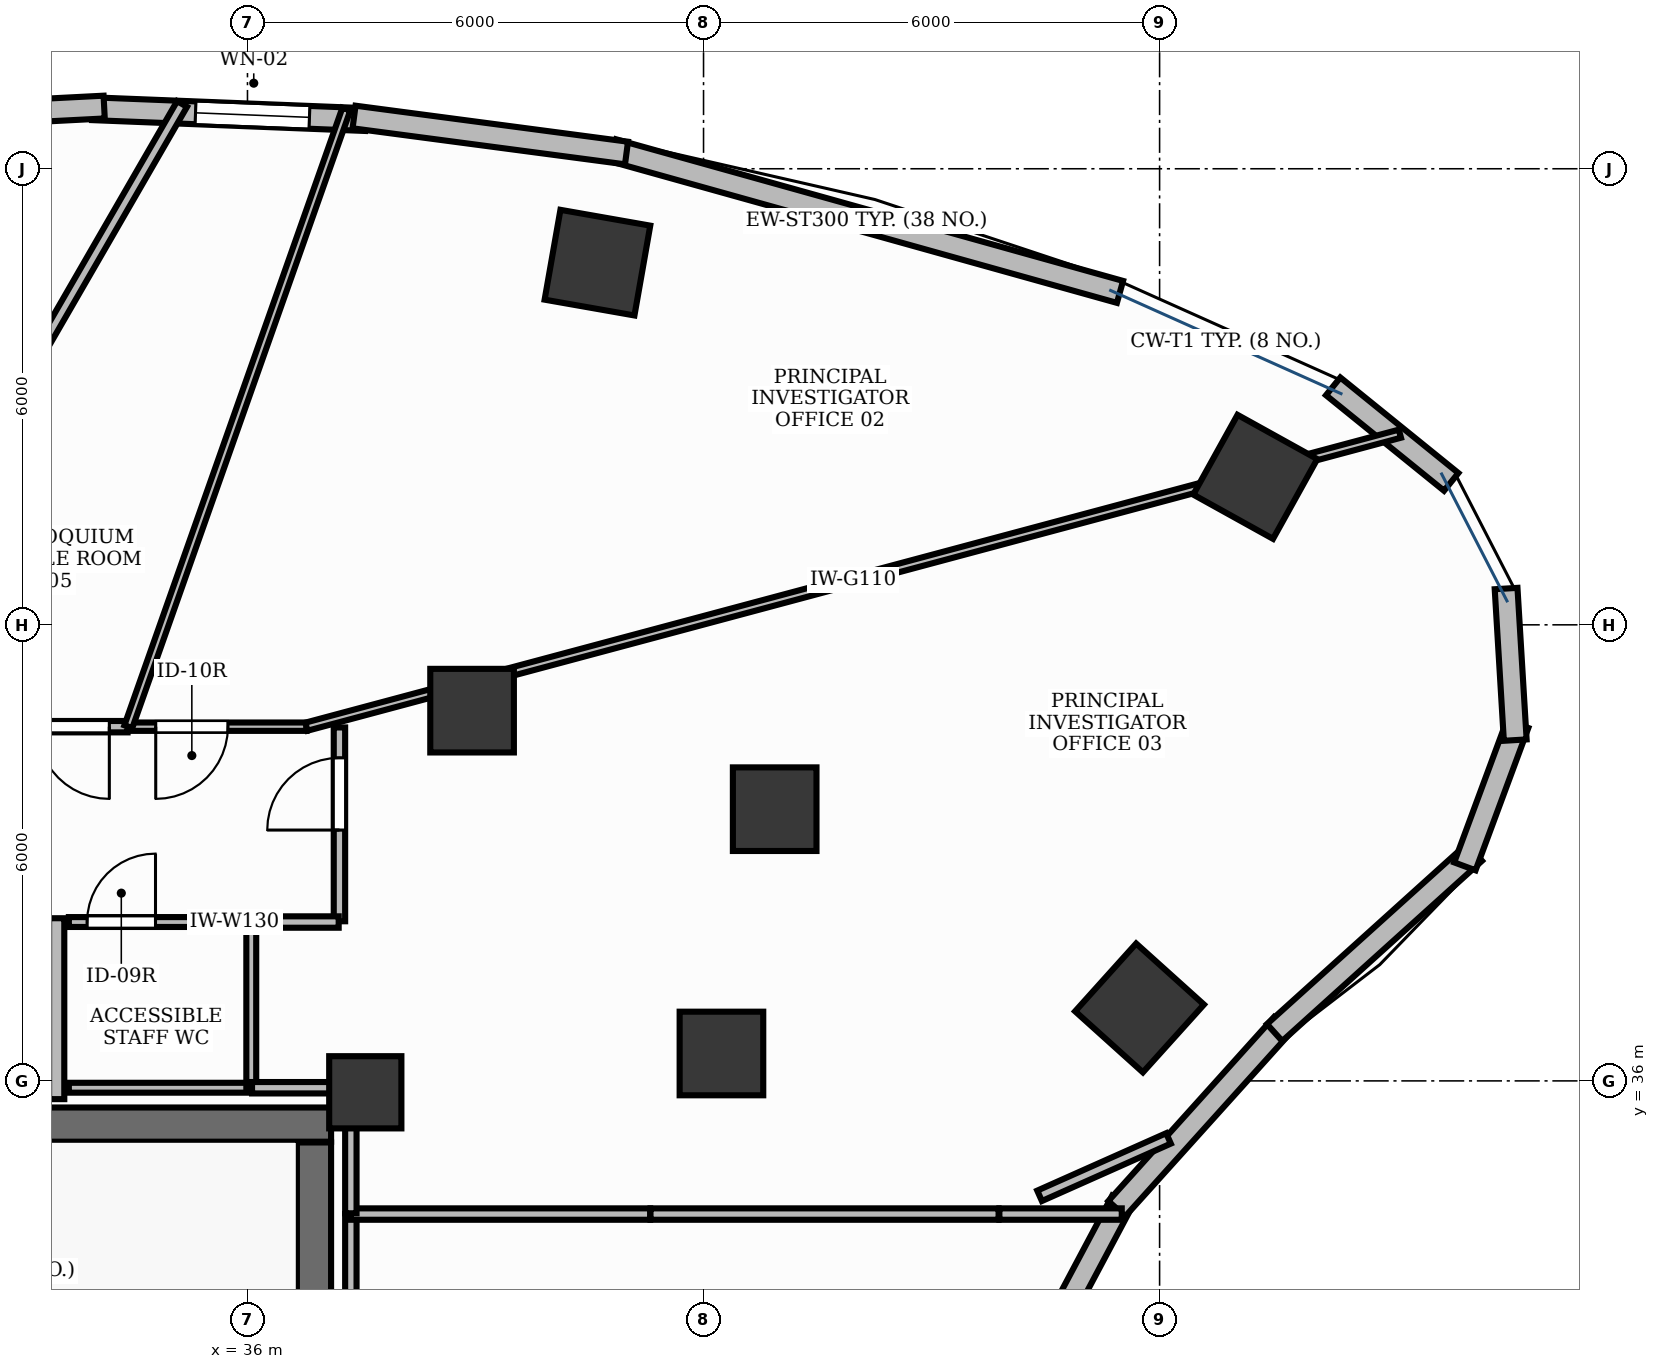
"""IFC4 building model, lengths in metres.
Left out: names, types, materials, properties, quantities, classifications, styles, units other than length and angle.
Written with IfcOpenShell. Run it as: python <this file> out.ifc"""

import sys

from ifc_helpers import new_model, si_unit, direction, frame, frame_2d, origin, origin_2d, place, context, subcontext, project, spatial, rectangle, extrude, element, fill, save


model = new_model("IFC4")
c1 = context("Model", 3, precision=1e-05, world=origin(), true_north=direction((0.0, 1.0)))
c2 = subcontext(c1, "Body", "Model", "MODEL_VIEW")
j1 = project(units=[si_unit("LENGTHUNIT", "METRE"), si_unit("PLANEANGLEUNIT", "RADIAN")], contexts=[c1])
p1 = place(None, origin())
s1 = spatial("IfcSite", under=j1, at=p1, CompositionType="ELEMENT")
p2 = place(p1, origin())
s2 = spatial("IfcBuilding", under=s1, at=p2, CompositionType="ELEMENT")
p3 = place(p2, frame((0.0, 0.0, 136.2)))
s3 = spatial("IfcBuildingStorey", under=s2, at=p3, CompositionType="ELEMENT", Elevation=136.2)
p4 = place(p3, frame((28.852, 35.425, 0.0), z_axis=(0.0, 0.0, 1.0), x_axis=(1.0, 0.0, 0.0)))
e1 = element("IfcWall", 1, at=p4, inside=s3, PredefinedType="SHEAR", context=c2, shape_type="SweptSolid", body=[
    extrude(rectangle(XDim=8.248, YDim=0.45, at=frame_2d((4.124, 0.0))), origin(), (0.0, 0.0, 1.0), 3.9),
])
p5 = place(p3, frame((36.875, 32.11, 0.0), z_axis=(0.0, 0.0, 1.0), x_axis=(0.0, 1.0, 0.0)))
e2 = element("IfcWall", 2, at=p5, inside=s3, PredefinedType="SHEAR", context=c2, shape_type="SweptSolid", body=[
    extrude(rectangle(XDim=3.08, YDim=0.45, at=frame_2d((1.54, 0.0))), origin(), (0.0, 0.0, 1.0), 3.9),
])
p6 = place(p3, frame((37.55, 35.85, -0.0), z_axis=(0.0, 0.0, 1.0), x_axis=(1.0, 0.0, 0.0)))
e3 = element("IfcColumn", 3, at=p6, inside=s3, PredefinedType="PILASTER", context=c2, shape_type="SweptSolid", body=[
    extrude(rectangle(XDim=0.95, YDim=0.95, at=origin_2d()), origin(), (0.0, 0.0, 1.0), 3.901),
])
p7 = place(p3, frame((49.259, 43.947, -0.0), z_axis=(0.0, 0.0, 1.0), x_axis=(-0.874535078577, 0.484962262797, 0.0)))
e4 = element("IfcColumn", 4, at=p7, inside=s3, PredefinedType="COLUMN", context=c2, shape_type="SweptSolid", body=[
    extrude(rectangle(XDim=1.2, YDim=1.2, at=origin_2d()), origin(), (0.0, 0.0, 1.0), 3.901),
])
p8 = place(p3, frame((42.936, 39.575, -0.0), z_axis=(0.0, 0.0, 1.0), x_axis=(1.0, 0.0, 0.0)))
e5 = element("IfcColumn", 5, at=p8, inside=s3, PredefinedType="COLUMN", context=c2, shape_type="SweptSolid", body=[
    extrude(rectangle(XDim=1.1, YDim=1.1, at=origin_2d()), origin(), (0.0, 0.0, 1.0), 3.901),
])
p9 = place(p3, frame((40.604, 46.765, -0.0), z_axis=(0.0, 0.0, 1.0), x_axis=(-0.984868307662, 0.173304404339, 0.0)))
e6 = element("IfcColumn", 6, at=p9, inside=s3, PredefinedType="COLUMN", context=c2, shape_type="SweptSolid", body=[
    extrude(rectangle(XDim=1.2, YDim=1.2, at=origin_2d()), origin(), (0.0, 0.0, 1.0), 3.901),
])
p10 = place(p3, frame((38.955, 40.871, -0.0), z_axis=(0.0, 0.0, 1.0), x_axis=(1.0, 0.0, 0.0)))
e7 = element("IfcColumn", 7, at=p10, inside=s3, PredefinedType="COLUMN", context=c2, shape_type="SweptSolid", body=[
    extrude(rectangle(XDim=1.1, YDim=1.1, at=origin_2d()), origin(), (0.0, 0.0, 1.0), 3.901),
])
p11 = place(p3, frame((47.736, 36.96, -0.0), z_axis=(0.0, 0.0, 1.0), x_axis=(0.669130606359, 0.743144825477, 0.0)))
e8 = element("IfcColumn", 8, at=p11, inside=s3, PredefinedType="COLUMN", context=c2, shape_type="SweptSolid", body=[
    extrude(rectangle(XDim=1.2, YDim=1.2, at=origin_2d()), origin(), (0.0, 0.0, 1.0), 3.901),
])
p12 = place(p3, frame((42.236, 36.361, -0.0), z_axis=(0.0, 0.0, 1.0), x_axis=(1.0, 0.0, 0.0)))
e9 = element("IfcColumn", 9, at=p12, inside=s3, PredefinedType="COLUMN", context=c2, shape_type="SweptSolid", body=[
    extrude(rectangle(XDim=1.1, YDim=1.1, at=origin_2d()), origin(), (0.0, 0.0, 1.0), 3.901),
])
p13 = place(p3, frame((37.554, 48.647, 0.0), z_axis=(0.0, 0.0, 1.0), x_axis=(-0.999210691503, 0.039723972445, 0.0)))
e10 = element("IfcWall", 10, at=p13, inside=s3, PredefinedType="STANDARD", context=c2, shape_type="SweptSolid", body=[
    extrude(rectangle(XDim=3.595, YDim=0.3, at=frame_2d((1.798, 0.0))), origin(), (0.0, 0.0, 1.0), 3.9),
])
p14 = place(p13, frame((0.739, 0.0, 0.95)))
e11 = element("IfcOpeningElement", 11, at=p14, cuts=e10, PredefinedType="OPENING", context=c2, shape_type="SweptSolid", body=[
    extrude(rectangle(XDim=1.5, YDim=1.8, at=frame_2d((0.75, 0.9))), frame((0.0, 0.165, 0.0), z_axis=(0.0, -1.0, 0.0), x_axis=(1.0, 0.0, 0.0)), (0.0, 0.0, 1.0), 0.33),
])
p15 = place(p3, frame((47.479, 46.38, 0.0), z_axis=(0.0, 0.0, 1.0), x_axis=(-0.963116215402, 0.269085777459, 0.0)))
e12 = element("IfcWall", 12, at=p15, inside=s3, PredefinedType="STANDARD", context=c2, shape_type="SweptSolid", body=[
    extrude(rectangle(XDim=6.924, YDim=0.3, at=frame_2d((3.462, 0.0))), origin(), (0.0, 0.0, 1.0), 3.9),
])
p16 = place(p3, frame((40.987, 48.207, 0.0), z_axis=(0.0, 0.0, 1.0), x_axis=(-0.991372969521, 0.131071107816, 0.0)))
e13 = element("IfcWall", 13, at=p16, inside=s3, PredefinedType="STANDARD", context=c2, shape_type="SweptSolid", body=[
    extrude(rectangle(XDim=3.615, YDim=0.3, at=frame_2d((1.808, 0.0))), origin(), (0.0, 0.0, 1.0), 3.9),
])
p17 = place(p3, frame((34.115, 48.812, 0.0), z_axis=(0.0, 0.0, 1.0), x_axis=(-0.998674767218, -0.051465613004, 0.0)))
e14 = element("IfcWall", 14, at=p17, inside=s3, PredefinedType="STANDARD", context=c2, shape_type="SweptSolid", body=[
    extrude(rectangle(XDim=3.634, YDim=0.3, at=frame_2d((1.817, 0.0))), origin(), (0.0, 0.0, 1.0), 3.9),
])
p18 = place(p3, frame((45.98, 31.547, 0.0), z_axis=(0.0, 0.0, 1.0), x_axis=(0.469451284634, 0.882958374645, 0.0)))
e15 = element("IfcWall", 15, at=p18, inside=s3, PredefinedType="STANDARD", context=c2, shape_type="SweptSolid", body=[
    extrude(rectangle(XDim=3.256, YDim=0.3, at=frame_2d((1.628, 0.0))), origin(), (0.0, 0.0, 1.0), 3.9),
])
p19 = place(p3, frame((47.437, 34.319, 0.0), z_axis=(0.0, 0.0, 1.0), x_axis=(0.669167727967, 0.743111399353, 0.0)))
e16 = element("IfcWall", 16, at=p19, inside=s3, PredefinedType="STANDARD", context=c2, shape_type="SweptSolid", body=[
    extrude(rectangle(XDim=3.255, YDim=0.3, at=frame_2d((1.628, 0.0))), origin(), (0.0, 0.0, 1.0), 3.9),
])
p20 = place(p3, frame((49.513, 36.636, 0.0), z_axis=(0.0, 0.0, 1.0), x_axis=(0.74255963233, 0.669779958221, 0.0)))
e17 = element("IfcWall", 17, at=p20, inside=s3, PredefinedType="STANDARD", context=c2, shape_type="SweptSolid", body=[
    extrude(rectangle(XDim=3.539, YDim=0.3, at=frame_2d((1.77, 0.0))), origin(), (0.0, 0.0, 1.0), 3.9),
])
p21 = place(p3, frame((52.016, 38.822, 0.0), z_axis=(0.0, 0.0, 1.0), x_axis=(0.347370087337, 0.937728117539, 0.0)))
e18 = element("IfcWall", 18, at=p21, inside=s3, PredefinedType="STANDARD", context=c2, shape_type="SweptSolid", body=[
    extrude(rectangle(XDim=1.997, YDim=0.3, at=frame_2d((0.999, 0.0))), origin(), (0.0, 0.0, 1.0), 3.9),
])
for number, where, z_axis, x_axis in (
    (19, (52.679, 40.483, 0.0), (0.0, 0.0, 1.0), (-0.06, 0.998, 0.0)),
    (20, (51.836, 43.881, 0.0), (0.0, 0.0, 1.0), (-0.777, 0.629, 0.0)),
):
    element("IfcWall", number, at=place(p3, frame(where, z_axis=z_axis, x_axis=x_axis)), inside=s3, PredefinedType="STANDARD", context=c2, shape_type="SweptSolid", body=[
        extrude(rectangle(XDim=1.998, YDim=0.3, at=frame_2d((0.999, 0.0))), origin(), (0.0, 0.0, 1.0), 3.9),
    ])
p22 = place(p3, frame((33.49, 35.76, 0.0), z_axis=(0.0, 0.0, 1.0), x_axis=(0.0, 1.0, 0.0)))
e21 = element("IfcWall", 21, at=p22, inside=s3, PredefinedType="PARTITIONING", context=c2, shape_type="SweptSolid", body=[
    extrude(rectangle(XDim=2.38, YDim=0.2, at=frame_2d((1.19, 0.0))), origin(), (0.0, 0.0, 1.0), 2.91),
])
p23 = place(p3, frame((33.65, 38.09, 0.0), z_axis=(0.0, 0.0, 1.0), x_axis=(1.0, 0.0, 0.0)))
e22 = element("IfcWall", 22, at=p23, inside=s3, PredefinedType="PARTITIONING", context=c2, shape_type="SweptSolid", body=[
    extrude(rectangle(XDim=2.4, YDim=0.13, at=frame_2d((1.2, 0.0))), origin(), (0.0, 0.0, 1.0), 2.91),
])
p24 = place(p23, frame((0.24, 0.0, 0.0)))
e23 = element("IfcOpeningElement", 23, at=p24, cuts=e22, PredefinedType="OPENING", context=c2, shape_type="SweptSolid", body=[
    extrude(rectangle(XDim=0.9, YDim=2.15, at=frame_2d((0.45, 1.075))), frame((0.0, 0.08, 0.0), z_axis=(0.0, -1.0, 0.0), x_axis=(1.0, 0.0, 0.0)), (0.0, 0.0, 1.0), 0.16),
])
p25 = place(p3, frame((36.776, 40.66, 0.0), z_axis=(0.0, 0.0, 1.0), x_axis=(-1.0, 0.0, 0.0)))
e24 = element("IfcWall", 24, at=p25, inside=s3, PredefinedType="MOVABLE", context=c2, shape_type="SweptSolid", body=[
    extrude(rectangle(XDim=2.344, YDim=0.11, at=frame_2d((1.172, 0.0))), origin(), (0.0, 0.0, 1.0), 2.91),
])
p26 = place(p25, frame((1.033, 0.0, 0.0)))
e25 = element("IfcOpeningElement", 25, at=p26, cuts=e24, PredefinedType="OPENING", context=c2, shape_type="SweptSolid", body=[
    extrude(rectangle(XDim=0.95, YDim=2.15, at=frame_2d((0.475, 1.075))), frame((0.0, 0.07, 0.0), z_axis=(0.0, -1.0, 0.0), x_axis=(1.0, 0.0, 0.0)), (0.0, 0.0, 1.0), 0.14),
])
p27 = place(p3, frame((37.21, 38.1, 0.0), z_axis=(0.0, 0.0, 1.0), x_axis=(0.0, 1.0, 0.0)))
e26 = element("IfcWall", 26, at=p27, inside=s3, PredefinedType="PARTITIONING", context=c2, shape_type="SweptSolid", body=[
    extrude(rectangle(XDim=2.55, YDim=0.15, at=frame_2d((1.275, 0.0))), origin(), (0.0, 0.0, 1.0), 2.91),
])
p28 = place(p27, frame((1.2, 0.0, 0.0)))
e27 = element("IfcOpeningElement", 27, at=p28, cuts=e26, PredefinedType="OPENING", context=c2, shape_type="SweptSolid", body=[
    extrude(rectangle(XDim=0.95, YDim=2.15, at=frame_2d((0.475, 1.075))), frame((0.0, 0.09, 0.0), z_axis=(0.0, -1.0, 0.0), x_axis=(1.0, 0.0, 0.0)), (0.0, 0.0, 1.0), 0.18),
])
p29 = place(p3, frame((34.423, 40.66, 0.0), z_axis=(0.0, 0.0, 1.0), x_axis=(-1.0, 0.0, 0.0)))
e28 = element("IfcWall", 28, at=p29, inside=s3, PredefinedType="PARTITIONING", context=c2, shape_type="SweptSolid", body=[
    extrude(rectangle(XDim=4.001, YDim=0.15, at=frame_2d((2.0, 0.0))), origin(), (0.0, 0.0, 1.0), 2.91),
])
p30 = place(p29, frame((0.24, 0.0, 0.0)))
e29 = element("IfcOpeningElement", 29, at=p30, cuts=e28, PredefinedType="OPENING", context=c2, shape_type="SweptSolid", body=[
    extrude(rectangle(XDim=0.95, YDim=2.15, at=frame_2d((0.475, 1.075))), frame((0.0, 0.09, 0.0), z_axis=(0.0, -1.0, 0.0), x_axis=(1.0, 0.0, 0.0)), (0.0, 0.0, 1.0), 0.18),
])
p31 = place(p3, frame((36.05, 35.91, 0.0), z_axis=(0.0, 0.0, 1.0), x_axis=(-1.0, 0.0, 0.0)))
e30 = element("IfcWall", 30, at=p31, inside=s3, PredefinedType="PARTITIONING", context=c2, shape_type="SweptSolid", body=[
    extrude(rectangle(XDim=2.4, YDim=0.13, at=frame_2d((1.2, 0.0))), origin(), (0.0, 0.0, 1.0), 2.91),
])
p32 = place(p3, frame((36.05, 38.09, 0.0), z_axis=(0.0, 0.0, 1.0), x_axis=(0.0, -1.0, 0.0)))
e31 = element("IfcWall", 31, at=p32, inside=s3, PredefinedType="PARTITIONING", context=c2, shape_type="SweptSolid", body=[
    extrude(rectangle(XDim=2.18, YDim=0.13, at=frame_2d((1.09, 0.0))), origin(), (0.0, 0.0, 1.0), 2.91),
])
p33 = place(p3, frame((37.36, 18.1, 0.0), z_axis=(0.0, 0.0, 1.0), x_axis=(0.0, 1.0, 0.0)))
e32 = element("IfcWall", 32, at=p33, inside=s3, PredefinedType="PARTITIONING", context=c2, shape_type="SweptSolid", body=[
    extrude(rectangle(XDim=16.148, YDim=0.15, at=frame_2d((8.074, 0.0))), origin(), (0.0, 0.0, 1.0), 2.91),
])
p34 = place(p3, frame((37.36, 34.248, 0.0), z_axis=(0.0, 0.0, 1.0), x_axis=(1.0, 0.0, 0.0)))
e33 = element("IfcWall", 33, at=p34, inside=s3, PredefinedType="PARTITIONING", context=c2, shape_type="SweptSolid", body=[
    extrude(rectangle(XDim=3.938, YDim=0.15, at=frame_2d((1.969, 0.0))), origin(), (0.0, 0.0, 1.0), 2.91),
])
p35 = place(p3, frame((41.302, 34.248, 0.0), z_axis=(0.0, 0.0, 1.0), x_axis=(1.0, 0.0, 0.0)))
e34 = element("IfcWall", 34, at=p35, inside=s3, PredefinedType="PARTITIONING", context=c2, shape_type="SweptSolid", body=[
    extrude(rectangle(XDim=4.58, YDim=0.15, at=frame_2d((2.29, 0.0))), origin(), (0.0, 0.0, 1.0), 2.91),
])
p36 = place(p3, frame((45.892, 34.248, 0.0), z_axis=(0.0, 0.0, 1.0), x_axis=(1.0, 0.0, 0.0)))
e35 = element("IfcWall", 35, at=p36, inside=s3, PredefinedType="PARTITIONING", context=c2, shape_type="SweptSolid", body=[
    extrude(rectangle(XDim=1.61, YDim=0.15, at=frame_2d((0.805, 0.0))), origin(), (0.0, 0.0, 1.0), 2.91),
])
p37 = place(p3, frame((51.162, 44.515, 0.0), z_axis=(0.0, 0.0, 1.0), x_axis=(-0.965923245436, -0.258828676785, 0.0)))
e36 = element("IfcWall", 36, at=p37, inside=s3, PredefinedType="MOVABLE", context=c2, shape_type="SweptSolid", body=[
    extrude(rectangle(XDim=14.893, YDim=0.11, at=frame_2d((7.447, 0.0))), origin(), (0.0, 0.0, 1.0), 2.91),
])
p38 = place(p3, frame((34.433, 40.66, 0.0), z_axis=(0.0, 0.0, 1.0), x_axis=(0.332889773539, 0.942965746288, 0.0)))
e37 = element("IfcWall", 37, at=p38, inside=s3, PredefinedType="MOVABLE", context=c2, shape_type="SweptSolid", body=[
    extrude(rectangle(XDim=8.617, YDim=0.11, at=frame_2d((4.308, 0.0))), origin(), (0.0, 0.0, 1.0), 2.91),
])
p39 = place(p3, frame((48.117, 35.243, 0.0), z_axis=(0.0, 0.0, 1.0), x_axis=(-0.913545637302, -0.406736239553, 0.0)))
e38 = element("IfcWall", 38, at=p39, inside=s3, PredefinedType="PARTITIONING", context=c2, shape_type="SweptSolid", body=[
    extrude(rectangle(XDim=1.856, YDim=0.15, at=frame_2d((0.928, 0.0))), origin(), (0.0, 0.0, 1.0), 2.91),
])
p40 = place(p3, frame((37.36, 34.258, 0.0), z_axis=(0.0, 0.0, 1.0), x_axis=(0.0, 1.0, 0.0)))
e39 = element("IfcWall", 39, at=p40, inside=s3, PredefinedType="PARTITIONING", context=c2, shape_type="SweptSolid", body=[
    extrude(rectangle(XDim=1.642, YDim=0.15, at=frame_2d((0.821, 0.0))), origin(), (0.0, 0.0, 1.0), 2.91),
])
p41 = place(p3, frame((37.35, 35.91, 0.0), z_axis=(0.0, 0.0, 1.0), x_axis=(-1.0, 0.0, 0.0)))
e40 = element("IfcWall", 40, at=p41, inside=s3, PredefinedType="PARTITIONING", context=c2, shape_type="SweptSolid", body=[
    extrude(rectangle(XDim=1.29, YDim=0.15, at=frame_2d((0.645, 0.0))), origin(), (0.0, 0.0, 1.0), 2.91),
])
p42 = place(p3, frame((36.06, 38.09, 0.0), z_axis=(0.0, 0.0, 1.0), x_axis=(1.0, 0.0, 0.0)))
e41 = element("IfcWall", 41, at=p42, inside=s3, PredefinedType="PARTITIONING", context=c2, shape_type="SweptSolid", body=[
    extrude(rectangle(XDim=1.14, YDim=0.15, at=frame_2d((0.57, 0.0))), origin(), (0.0, 0.0, 1.0), 2.91),
])
p43 = place(p3, frame((35.139, 48.852, 0.0), z_axis=(0.0, 0.0, 1.0), x_axis=(-0.499980869596, -0.866036448446, 0.0)))
e42 = element("IfcWall", 42, at=p43, inside=s3, PredefinedType="PARTITIONING", context=c2, shape_type="SweptSolid", body=[
    extrude(rectangle(XDim=9.459, YDim=0.15, at=frame_2d((4.729, 0.0))), origin(), (0.0, 0.0, 1.0), 2.91),
])
p44 = place(p14, origin())
e43 = element("IfcWindow", 43, at=p44, inside=s3, PartitioningType="DOUBLE_PANEL_VERTICAL", PredefinedType="WINDOW", context=c2, shape_type="SweptSolid", body=[
    extrude(rectangle(XDim=1.5, YDim=1.8, at=frame_2d((0.75, 0.9))), frame((0.0, 0.03, 0.0), z_axis=(0.0, -1.0, 0.0), x_axis=(1.0, 0.0, 0.0)), (0.0, 0.0, 1.0), 0.06),
])
fill(e11, e43)
p45 = place(p24, origin())
e44 = element("IfcDoor", 44, at=p45, inside=s3, OperationType="SINGLE_SWING_RIGHT", PredefinedType="DOOR", context=c2, shape_type="SweptSolid", body=[
    extrude(rectangle(XDim=0.9, YDim=2.15, at=frame_2d((0.45, 1.075))), frame((0.0, 0.025, 0.0), z_axis=(0.0, -1.0, 0.0), x_axis=(1.0, 0.0, 0.0)), (0.0, 0.0, 1.0), 0.05),
])
fill(e23, e44)
p46 = place(p26, origin())
e45 = element("IfcDoor", 45, at=p46, inside=s3, OperationType="SINGLE_SWING_RIGHT", PredefinedType="DOOR", context=c2, shape_type="SweptSolid", body=[
    extrude(rectangle(XDim=0.95, YDim=2.15, at=frame_2d((0.475, 1.075))), frame((0.0, 0.025, 0.0), z_axis=(0.0, -1.0, 0.0), x_axis=(1.0, 0.0, 0.0)), (0.0, 0.0, 1.0), 0.05),
])
fill(e25, e45)
p47 = place(p28, origin())
e46 = element("IfcDoor", 46, at=p47, inside=s3, OperationType="SINGLE_SWING_LEFT", PredefinedType="DOOR", context=c2, shape_type="SweptSolid", body=[
    extrude(rectangle(XDim=0.95, YDim=2.15, at=frame_2d((0.475, 1.075))), frame((0.0, 0.025, 0.0), z_axis=(0.0, -1.0, 0.0), x_axis=(1.0, 0.0, 0.0)), (0.0, 0.0, 1.0), 0.05),
])
fill(e27, e46)
p48 = place(p30, origin())
e47 = element("IfcDoor", 47, at=p48, inside=s3, OperationType="SINGLE_SWING_LEFT", PredefinedType="DOOR", context=c2, shape_type="SweptSolid", body=[
    extrude(rectangle(XDim=0.95, YDim=2.15, at=frame_2d((0.475, 1.075))), frame((0.0, 0.025, 0.0), z_axis=(0.0, -1.0, 0.0), x_axis=(1.0, 0.0, 0.0)), (0.0, 0.0, 1.0), 0.05),
])
fill(e29, e47)
save(model, sys.argv[1])
